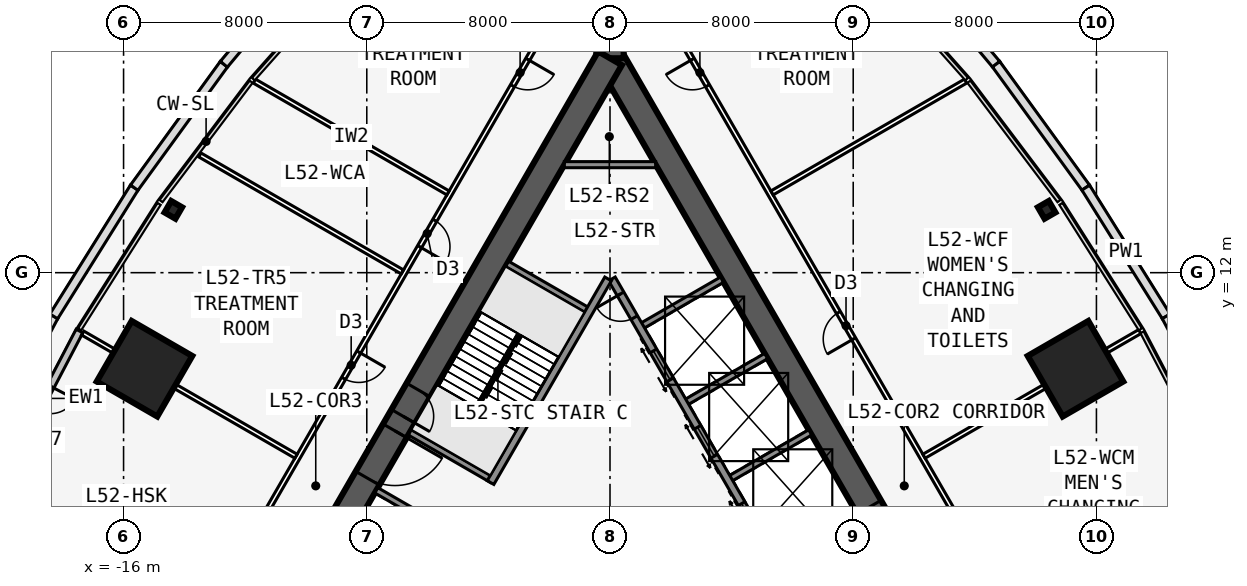
"""IFC4 building model, lengths in metres.
Left out: names, types, materials, properties, quantities, classifications, styles, units other than length and angle.
Written with IfcOpenShell. Run it as: python <this file> out.ifc"""

import sys

from ifc_helpers import new_model, si_unit, direction, frame, frame_2d, origin, origin_2d, place, context, subcontext, project, spatial, rectangle, i_section, extrude, element, fill, save


model = new_model("IFC4")
c1 = context("Model", 3, precision=1e-05, world=origin(), true_north=direction((0.0, 1.0)))
c2 = subcontext(c1, "Body", "Model", "MODEL_VIEW")
j1 = project(units=[si_unit("LENGTHUNIT", "METRE"), si_unit("PLANEANGLEUNIT", "RADIAN")], contexts=[c1])
p1 = place(None, origin())
s1 = spatial("IfcSite", under=j1, at=p1, CompositionType="ELEMENT")
p2 = place(p1, origin())
s2 = spatial("IfcBuilding", under=s1, at=p2, CompositionType="ELEMENT")
p3 = place(p2, frame((0.0, 0.0, 195.9)))
s3 = spatial("IfcBuildingStorey", under=s2, at=p3, CompositionType="ELEMENT", Elevation=195.9)
p4 = place(p3, frame((16.5, -9.526, 0.0), z_axis=(0.0, 0.0, 1.0), x_axis=(-0.499999749417, 0.866025548458, 0.0)))
e1 = element("IfcWall", 1, at=p4, inside=s3, PredefinedType="SHEAR", context=c2, shape_type="SweptSolid", body=[
    extrude(rectangle(XDim=33.0, YDim=0.9, at=frame_2d((16.5, 0.0))), origin(), (0.0, 0.0, 1.0), 5.0),
])
p5 = place(p4, frame((14.15, 0.0, 0.0)))
e2 = element("IfcOpeningElement", 2, at=p5, cuts=e1, PredefinedType="OPENING", context=c2, shape_type="SweptSolid", body=[
    extrude(rectangle(XDim=1.8, YDim=2.13, at=frame_2d((0.9, 1.065))), frame((0.0, 0.46, 0.0), z_axis=(0.0, -1.0, 0.0), x_axis=(1.0, 0.0, 0.0)), (0.0, 0.0, 1.0), 0.92),
])
p6 = place(p4, frame((12.6, 0.0, 0.0)))
e3 = element("IfcOpeningElement", 3, at=p6, cuts=e1, PredefinedType="OPENING", context=c2, shape_type="SweptSolid", body=[
    extrude(rectangle(XDim=1.0, YDim=2.13, at=frame_2d((0.5, 1.065))), frame((0.0, 0.46, 0.0), z_axis=(0.0, -1.0, 0.0), x_axis=(1.0, 0.0, 0.0)), (0.0, 0.0, 1.0), 0.92),
])
p7 = place(p3, frame((5.379, 2.586, 0.0), z_axis=(0.0, 0.0, 1.0), x_axis=(-0.500001375892, 0.866024609411, 0.0)))
e4 = element("IfcWall", 4, at=p7, inside=s3, PredefinedType="SOLIDWALL", context=c2, shape_type="SweptSolid", body=[
    extrude(rectangle(XDim=10.633, YDim=0.25, at=frame_2d((5.316, 0.0))), origin(), (0.0, 0.0, 1.0), 4.835),
])
p8 = place(p7, frame((9.164, 0.0, 0.0)))
e5 = element("IfcOpeningElement", 5, at=p8, cuts=e4, PredefinedType="OPENING", context=c2, shape_type="SweptSolid", body=[
    extrude(rectangle(XDim=0.9, YDim=2.13, at=frame_2d((0.45, 1.065))), frame((0.0, 0.135, 0.0), z_axis=(0.0, -1.0, 0.0), x_axis=(1.0, 0.0, 0.0)), (0.0, 0.0, 1.0), 0.27),
])
p9 = place(p7, frame((1.0, 0.0, 0.0)))
e6 = element("IfcOpeningElement", 6, at=p9, cuts=e4, PredefinedType="OPENING", context=c2, shape_type="SweptSolid", body=[
    extrude(rectangle(XDim=1.1, YDim=2.13, at=frame_2d((0.55, 1.065))), frame((0.0, 0.135, 0.0), z_axis=(0.0, -1.0, 0.0), x_axis=(1.0, 0.0, 0.0)), (0.0, 0.0, 1.0), 0.27),
])
p10 = place(p7, frame((3.9, 0.0, 0.0)))
e7 = element("IfcOpeningElement", 7, at=p10, cuts=e4, PredefinedType="OPENING", context=c2, shape_type="SweptSolid", body=[
    extrude(rectangle(XDim=1.1, YDim=2.13, at=frame_2d((0.55, 1.065))), frame((0.0, 0.135, 0.0), z_axis=(0.0, -1.0, 0.0), x_axis=(1.0, 0.0, 0.0)), (0.0, 0.0, 1.0), 0.27),
])
p11 = place(p7, frame((6.8, 0.0, 0.0)))
e8 = element("IfcOpeningElement", 8, at=p11, cuts=e4, PredefinedType="OPENING", context=c2, shape_type="SweptSolid", body=[
    extrude(rectangle(XDim=1.1, YDim=2.13, at=frame_2d((0.55, 1.065))), frame((0.0, 0.135, 0.0), z_axis=(0.0, -1.0, 0.0), x_axis=(1.0, 0.0, 0.0)), (0.0, 0.0, 1.0), 0.27),
])
for number, where, z_axis, x_axis in (
    (9, (3.879, 5.184, 0.0), (0.0, 0.0, 1.0), (0.866, 0.5, 0.0)),
    (10, (2.429, 7.696, 0.0), (0.0, 0.0, 1.0), (0.866, 0.5, 0.0)),
    (11, (0.979, 10.207, 0.0), (0.0, 0.0, 1.0), (0.866, 0.5, 0.0)),
):
    element("IfcWall", number, at=place(p3, frame(where, z_axis=z_axis, x_axis=x_axis)), inside=s3, PredefinedType="SOLIDWALL", context=c2, shape_type="SweptSolid", body=[
        extrude(rectangle(XDim=3.125, YDim=0.2, at=frame_2d((1.562, 0.0))), origin(), (0.0, 0.0, 1.0), 4.835),
    ])
p12 = place(p3, frame((0.0, 19.052, 0.0), z_axis=(0.0, 0.0, 1.0), x_axis=(-0.499999749417, -0.866025548458, 0.0)))
e12 = element("IfcWall", 12, at=p12, inside=s3, PredefinedType="SHEAR", context=c2, shape_type="SweptSolid", body=[
    extrude(rectangle(XDim=33.0, YDim=0.9, at=frame_2d((16.5, 0.0))), origin(), (0.0, 0.0, 1.0), 5.0),
])
p13 = place(p12, frame((14.15, 0.0, 0.0)))
e13 = element("IfcOpeningElement", 13, at=p13, cuts=e12, PredefinedType="OPENING", context=c2, shape_type="SweptSolid", body=[
    extrude(rectangle(XDim=1.8, YDim=2.13, at=frame_2d((0.9, 1.065))), frame((0.0, 0.46, 0.0), z_axis=(0.0, -1.0, 0.0), x_axis=(1.0, 0.0, 0.0)), (0.0, 0.0, 1.0), 0.92),
])
p14 = place(p12, frame((12.6, 0.0, 0.0)))
e14 = element("IfcOpeningElement", 14, at=p14, cuts=e12, PredefinedType="OPENING", context=c2, shape_type="SweptSolid", body=[
    extrude(rectangle(XDim=1.0, YDim=2.13, at=frame_2d((0.5, 1.065))), frame((0.0, 0.46, 0.0), z_axis=(0.0, -1.0, 0.0), x_axis=(1.0, 0.0, 0.0)), (0.0, 0.0, 1.0), 0.92),
])
p15 = place(p3, frame((-0.062, 11.794, 0.0), z_axis=(0.0, 0.0, 1.0), x_axis=(-0.500006680225, -0.86602154692, 0.0)))
e15 = element("IfcWall", 15, at=p15, inside=s3, PredefinedType="SOLIDWALL", context=c2, shape_type="SweptSolid", body=[
    extrude(rectangle(XDim=7.733, YDim=0.25, at=frame_2d((3.866, 0.0))), origin(), (0.0, 0.0, 1.0), 4.835),
])
for number, where, z_axis, x_axis in (
    (16, (-0.679, 10.727, 0.0), (0.0, 0.0, 1.0), (-0.866, 0.5, 0.0)),
    (17, (-3.879, 5.184, 0.0), (0.0, 0.0, 1.0), (-0.866, 0.5, 0.0)),
    (18, (-4.979, 3.279, 0.0), (0.0, 0.0, 1.0), (-0.866, 0.5, 0.0)),
):
    element("IfcWall", number, at=place(p3, frame(where, z_axis=z_axis, x_axis=x_axis)), inside=s3, PredefinedType="SOLIDWALL", context=c2, shape_type="SweptSolid", body=[
        extrude(rectangle(XDim=3.125, YDim=0.2, at=frame_2d((1.562, 0.0))), origin(), (0.0, 0.0, 1.0), 4.835),
    ])
p16 = place(p3, frame((0.0, 19.052, 0.0), z_axis=(0.0, 0.0, 1.0), x_axis=(0.0, 1.0, 0.0)))
e19 = element("IfcWall", 19, at=p16, inside=s3, PredefinedType="SHEAR", context=c2, shape_type="SweptSolid", body=[
    extrude(rectangle(XDim=4.746, YDim=0.9, at=frame_2d((2.373, 0.0))), origin(), (0.0, 0.0, 1.0), 5.0),
])
p17 = place(p16, frame((1.8, 0.0, 0.0)))
e20 = element("IfcOpeningElement", 20, at=p17, cuts=e19, PredefinedType="OPENING", context=c2, shape_type="SweptSolid", body=[
    extrude(rectangle(XDim=1.8, YDim=2.13, at=frame_2d((0.9, 1.065))), frame((0.0, 0.46, 0.0), z_axis=(0.0, -1.0, 0.0), x_axis=(1.0, 0.0, 0.0)), (0.0, 0.0, 1.0), 0.92),
])
for number, where, z_axis, x_axis in (
    (21, (14.363, 14.066, 0.0), (0.0, 0.0, 1.0), (0.866, 0.5, 0.0)),
    (22, (-14.363, 14.066, 0.0), (0.0, 0.0, 1.0), (-0.866, 0.5, 0.0)),
):
    element("IfcColumn", number, at=place(p3, frame(where, z_axis=z_axis, x_axis=x_axis)), inside=s3, PredefinedType="COLUMN", context=c2, shape_type="SweptSolid", body=[
        extrude(i_section(OverallWidth=0.411, OverallDepth=0.434, WebThickness=0.036, FlangeThickness=0.057, at=origin_2d()), origin(), (0.0, 0.0, 1.0), 5.0),
    ])
for number, where, z_axis, x_axis in (
    (23, (15.312, 8.84, 0.0), (0.0, 0.0, 1.0), (0.866, 0.5, 0.0)),
    (24, (-15.312, 8.84, 0.0), (0.0, 0.0, 1.0), (-0.866, 0.5, 0.0)),
):
    element("IfcColumn", number, at=place(p3, frame(where, z_axis=z_axis, x_axis=x_axis)), inside=s3, PredefinedType="COLUMN", context=c2, shape_type="SweptSolid", body=[
        extrude(rectangle(XDim=2.3, YDim=2.3, at=origin_2d()), origin(), (0.0, 0.0, 1.0), 5.0),
    ])
p18 = place(p3, frame((-17.45, 10.081, 0.0), z_axis=(0.0, 0.0, 1.0), x_axis=(-0.463976002579, -0.885847768542, 0.0)))
e25 = element("IfcWall", 25, at=p18, inside=s3, PredefinedType="STANDARD", context=c2, shape_type="SweptSolid", body=[
    extrude(rectangle(XDim=5.004, YDim=0.25, at=frame_2d((2.502, 0.0))), origin(), (0.0, 0.0, 1.0), 4.835),
])
p19 = place(p18, frame((2.052, 0.0, 0.0)))
e26 = element("IfcOpeningElement", 26, at=p19, cuts=e25, PredefinedType="OPENING", context=c2, shape_type="SweptSolid", body=[
    extrude(rectangle(XDim=0.9, YDim=2.13, at=frame_2d((0.45, 1.065))), frame((0.0, 0.135, 0.0), z_axis=(0.0, -1.0, 0.0), x_axis=(1.0, 0.0, 0.0)), (0.0, 0.0, 1.0), 0.27),
])
p20 = place(p3, frame((-20.638, 6.154, 0.0), z_axis=(0.0, 0.0, 1.0), x_axis=(0.469412641147, 0.882978919528, 0.0)))
e27 = element("IfcWall", 27, at=p20, inside=s3, PredefinedType="PARAPET", context=c2, shape_type="SweptSolid", body=[
    extrude(rectangle(XDim=4.992, YDim=0.3, at=frame_2d((2.496, 0.0))), origin(), (0.0, 0.0, 1.0), 1.1),
])
p21 = place(p3, frame((-18.295, 10.562, 0.0), z_axis=(0.0, 0.0, 1.0), x_axis=(0.529972566993, 0.848014786566, 0.0)))
e28 = element("IfcWall", 28, at=p21, inside=s3, PredefinedType="PARAPET", context=c2, shape_type="SweptSolid", body=[
    extrude(rectangle(XDim=4.993, YDim=0.3, at=frame_2d((2.496, 0.0))), origin(), (0.0, 0.0, 1.0), 1.1),
])
p22 = place(p3, frame((-15.649, 14.796, 0.0), z_axis=(0.0, 0.0, 1.0), x_axis=(0.587682609785, 0.809091558574, 0.0)))
e29 = element("IfcWall", 29, at=p22, inside=s3, PredefinedType="PARAPET", context=c2, shape_type="SweptSolid", body=[
    extrude(rectangle(XDim=5.017, YDim=0.3, at=frame_2d((2.509, 0.0))), origin(), (0.0, 0.0, 1.0), 1.1),
])
for number, where, z_axis, x_axis in (
    (30, (-12.7, 18.856, 0.0), (0.0, 0.0, 1.0), (0.642, 0.767, 0.0)),
    (31, (9.449, 22.74, 0.0), (0.0, 0.0, 1.0), (0.642, -0.767, 0.0)),
):
    element("IfcWall", number, at=place(p3, frame(where, z_axis=z_axis, x_axis=x_axis)), inside=s3, PredefinedType="PARAPET", context=c2, shape_type="SweptSolid", body=[
        extrude(rectangle(XDim=5.066, YDim=0.3, at=frame_2d((2.533, 0.0))), origin(), (0.0, 0.0, 1.0), 1.1),
    ])
p23 = place(p3, frame((12.7, 18.856, 0.0), z_axis=(0.0, 0.0, 1.0), x_axis=(0.587682609785, -0.809091558574, 0.0)))
e32 = element("IfcWall", 32, at=p23, inside=s3, PredefinedType="PARAPET", context=c2, shape_type="SweptSolid", body=[
    extrude(rectangle(XDim=5.017, YDim=0.3, at=frame_2d((2.509, 0.0))), origin(), (0.0, 0.0, 1.0), 1.1),
])
p24 = place(p3, frame((15.649, 14.796, 0.0), z_axis=(0.0, 0.0, 1.0), x_axis=(0.529972566993, -0.848014786566, 0.0)))
e33 = element("IfcWall", 33, at=p24, inside=s3, PredefinedType="PARAPET", context=c2, shape_type="SweptSolid", body=[
    extrude(rectangle(XDim=4.993, YDim=0.3, at=frame_2d((2.496, 0.0))), origin(), (0.0, 0.0, 1.0), 1.1),
])
p25 = place(p3, frame((18.295, 10.562, 0.0), z_axis=(0.0, 0.0, 1.0), x_axis=(0.469412641147, -0.882978919528, 0.0)))
e34 = element("IfcWall", 34, at=p25, inside=s3, PredefinedType="PARAPET", context=c2, shape_type="SweptSolid", body=[
    extrude(rectangle(XDim=4.992, YDim=0.3, at=frame_2d((2.496, 0.0))), origin(), (0.0, 0.0, 1.0), 1.1),
])
p26 = place(p3, frame((20.027, -10.985, 0.0), z_axis=(0.0, 0.0, 1.0), x_axis=(-0.500001677587, 0.866024435227, 0.0)))
e35 = element("IfcWall", 35, at=p26, inside=s3, PredefinedType="PARTITIONING", context=c2, shape_type="SweptSolid", body=[
    extrude(rectangle(XDim=39.054, YDim=0.15, at=frame_2d((19.527, 0.0))), origin(), (0.0, 0.0, 1.0), 4.835),
])
p27 = place(p26, frame((4.414, 0.0, 0.0)))
e36 = element("IfcOpeningElement", 36, at=p27, cuts=e35, PredefinedType="OPENING", context=c2, shape_type="SweptSolid", body=[
    extrude(rectangle(XDim=1.0, YDim=2.13, at=frame_2d((0.5, 1.065))), frame((0.0, 0.085, 0.0), z_axis=(0.0, -1.0, 0.0), x_axis=(1.0, 0.0, 0.0)), (0.0, 0.0, 1.0), 0.17),
])
p28 = place(p26, frame((14.027, 0.0, 0.0)))
e37 = element("IfcOpeningElement", 37, at=p28, cuts=e35, PredefinedType="OPENING", context=c2, shape_type="SweptSolid", body=[
    extrude(rectangle(XDim=1.0, YDim=2.13, at=frame_2d((0.5, 1.065))), frame((0.0, 0.085, 0.0), z_axis=(0.0, -1.0, 0.0), x_axis=(1.0, 0.0, 0.0)), (0.0, 0.0, 1.0), 0.17),
])
p29 = place(p26, frame((24.027, 0.0, 0.0)))
e38 = element("IfcOpeningElement", 38, at=p29, cuts=e35, PredefinedType="OPENING", context=c2, shape_type="SweptSolid", body=[
    extrude(rectangle(XDim=1.0, YDim=2.13, at=frame_2d((0.5, 1.065))), frame((0.0, 0.085, 0.0), z_axis=(0.0, -1.0, 0.0), x_axis=(1.0, 0.0, 0.0)), (0.0, 0.0, 1.0), 0.17),
])
p30 = place(p26, frame((33.64, 0.0, 0.0)))
e39 = element("IfcOpeningElement", 39, at=p30, cuts=e35, PredefinedType="OPENING", context=c2, shape_type="SweptSolid", body=[
    extrude(rectangle(XDim=1.0, YDim=2.13, at=frame_2d((0.5, 1.065))), frame((0.0, 0.085, 0.0), z_axis=(0.0, -1.0, 0.0), x_axis=(1.0, 0.0, 0.0)), (0.0, 0.0, 1.0), 0.17),
])
p31 = place(p3, frame((10.329, 5.963, 0.0), z_axis=(0.0, 0.0, 1.0), x_axis=(0.866026800146, 0.499997581422, 0.0)))
e40 = element("IfcWall", 40, at=p31, inside=s3, PredefinedType="PARTITIONING", context=c2, shape_type="SweptSolid", body=[
    extrude(rectangle(XDim=8.193, YDim=0.15, at=frame_2d((4.097, 0.0))), origin(), (0.0, 0.0, 1.0), 3.989),
])
p32 = place(p3, frame((5.329, 14.623, 0.0), z_axis=(0.0, 0.0, 1.0), x_axis=(0.866018089937, 0.500012667742, 0.0)))
e41 = element("IfcWall", 41, at=p32, inside=s3, PredefinedType="PARTITIONING", context=c2, shape_type="SweptSolid", body=[
    extrude(rectangle(XDim=7.355, YDim=0.15, at=frame_2d((3.677, 0.0))), origin(), (0.0, 0.0, 1.0), 3.989),
])
p33 = place(p3, frame((-0.5, 22.836, 0.0), z_axis=(0.0, 0.0, 1.0), x_axis=(-0.500001677587, -0.866024435227, 0.0)))
e42 = element("IfcWall", 42, at=p33, inside=s3, PredefinedType="PARTITIONING", context=c2, shape_type="SweptSolid", body=[
    extrude(rectangle(XDim=39.054, YDim=0.15, at=frame_2d((19.527, 0.0))), origin(), (0.0, 0.0, 1.0), 4.835),
])
p34 = place(p33, frame((4.414, 0.0, 0.0)))
e43 = element("IfcOpeningElement", 43, at=p34, cuts=e42, PredefinedType="OPENING", context=c2, shape_type="SweptSolid", body=[
    extrude(rectangle(XDim=1.0, YDim=2.13, at=frame_2d((0.5, 1.065))), frame((0.0, 0.085, 0.0), z_axis=(0.0, -1.0, 0.0), x_axis=(1.0, 0.0, 0.0)), (0.0, 0.0, 1.0), 0.17),
])
p35 = place(p33, frame((10.527, 0.0, 0.0)))
e44 = element("IfcOpeningElement", 44, at=p35, cuts=e42, PredefinedType="OPENING", context=c2, shape_type="SweptSolid", body=[
    extrude(rectangle(XDim=1.0, YDim=2.13, at=frame_2d((0.5, 1.065))), frame((0.0, 0.085, 0.0), z_axis=(0.0, -1.0, 0.0), x_axis=(1.0, 0.0, 0.0)), (0.0, 0.0, 1.0), 0.17),
])
p36 = place(p33, frame((15.527, 0.0, 0.0)))
e45 = element("IfcOpeningElement", 45, at=p36, cuts=e42, PredefinedType="OPENING", context=c2, shape_type="SweptSolid", body=[
    extrude(rectangle(XDim=1.0, YDim=2.13, at=frame_2d((0.5, 1.065))), frame((0.0, 0.085, 0.0), z_axis=(0.0, -1.0, 0.0), x_axis=(1.0, 0.0, 0.0)), (0.0, 0.0, 1.0), 0.17),
])
p37 = place(p33, frame((24.027, 0.0, 0.0)))
e46 = element("IfcOpeningElement", 46, at=p37, cuts=e42, PredefinedType="OPENING", context=c2, shape_type="SweptSolid", body=[
    extrude(rectangle(XDim=1.0, YDim=2.13, at=frame_2d((0.5, 1.065))), frame((0.0, 0.085, 0.0), z_axis=(0.0, -1.0, 0.0), x_axis=(1.0, 0.0, 0.0)), (0.0, 0.0, 1.0), 0.17),
])
p38 = place(p33, frame((33.64, 0.0, 0.0)))
e47 = element("IfcOpeningElement", 47, at=p38, cuts=e42, PredefinedType="OPENING", context=c2, shape_type="SweptSolid", body=[
    extrude(rectangle(XDim=1.0, YDim=2.13, at=frame_2d((0.5, 1.065))), frame((0.0, 0.085, 0.0), z_axis=(0.0, -1.0, 0.0), x_axis=(1.0, 0.0, 0.0)), (0.0, 0.0, 1.0), 0.17),
])
p39 = place(p3, frame((-5.329, 14.623, 0.0), z_axis=(0.0, 0.0, 1.0), x_axis=(-0.866018089937, 0.500012667742, 0.0)))
e48 = element("IfcWall", 48, at=p39, inside=s3, PredefinedType="PARTITIONING", context=c2, shape_type="SweptSolid", body=[
    extrude(rectangle(XDim=7.355, YDim=0.15, at=frame_2d((3.677, 0.0))), origin(), (0.0, 0.0, 1.0), 3.989),
])
p40 = place(p3, frame((-6.829, 12.025, 0.0), z_axis=(0.0, 0.0, 1.0), x_axis=(-0.866029684289, 0.499992585876, 0.0)))
e49 = element("IfcWall", 49, at=p40, inside=s3, PredefinedType="PARTITIONING", context=c2, shape_type="SweptSolid", body=[
    extrude(rectangle(XDim=7.693, YDim=0.15, at=frame_2d((3.846, 0.0))), origin(), (0.0, 0.0, 1.0), 4.835),
])
p41 = place(p3, frame((-10.329, 5.963, 0.0), z_axis=(0.0, 0.0, 1.0), x_axis=(-0.866016460812, 0.500015489362, 0.0)))
e50 = element("IfcWall", 50, at=p41, inside=s3, PredefinedType="PARTITIONING", context=c2, shape_type="SweptSolid", body=[
    extrude(rectangle(XDim=8.101, YDim=0.15, at=frame_2d((4.051, 0.0))), origin(), (0.0, 0.0, 1.0), 3.989),
])
p42 = place(p3, frame((-1.501, 15.552, 0.0), z_axis=(0.0, 0.0, 1.0), x_axis=(1.0, 0.0, 0.0)))
e51 = element("IfcWall", 51, at=p42, inside=s3, PredefinedType="SOLIDWALL", context=c2, shape_type="SweptSolid", body=[
    extrude(rectangle(XDim=3.002, YDim=0.2, at=frame_2d((1.501, 0.0))), origin(), (0.0, 0.0, 1.0), 4.835),
])
p43 = place(p3, frame((-2.988, 9.978, 0.0), z_axis=(0.0, 0.0, 1.0), x_axis=(-0.499992232847, -0.866029888106, 0.0)))
e52 = element("IfcWall", 52, at=p43, inside=s3, PredefinedType="SOLIDWALL", context=c2, shape_type="SweptSolid", body=[
    extrude(rectangle(XDim=2.794, YDim=0.1, at=frame_2d((1.397, 0.0))), origin(), (0.0, 0.0, 1.0), 5.0),
])
p44 = place(p29, origin())
e53 = element("IfcDoor", 53, at=p44, inside=s3, OperationType="SINGLE_SWING_LEFT", PredefinedType="DOOR", context=c2, shape_type="SweptSolid", body=[
    extrude(rectangle(XDim=1.0, YDim=2.13, at=frame_2d((0.5, 1.065))), frame((0.0, 0.025, 0.0), z_axis=(0.0, -1.0, 0.0), x_axis=(1.0, 0.0, 0.0)), (0.0, 0.0, 1.0), 0.05),
])
fill(e38, e53)
p45 = place(p30, origin())
e54 = element("IfcDoor", 54, at=p45, inside=s3, OperationType="SINGLE_SWING_RIGHT", PredefinedType="DOOR", context=c2, shape_type="SweptSolid", body=[
    extrude(rectangle(XDim=1.0, YDim=2.13, at=frame_2d((0.5, 1.065))), frame((0.0, 0.025, 0.0), z_axis=(0.0, -1.0, 0.0), x_axis=(1.0, 0.0, 0.0)), (0.0, 0.0, 1.0), 0.05),
])
fill(e39, e54)
p46 = place(p34, origin())
e55 = element("IfcDoor", 55, at=p46, inside=s3, OperationType="SINGLE_SWING_LEFT", PredefinedType="DOOR", context=c2, shape_type="SweptSolid", body=[
    extrude(rectangle(XDim=1.0, YDim=2.13, at=frame_2d((0.5, 1.065))), frame((0.0, 0.025, 0.0), z_axis=(0.0, -1.0, 0.0), x_axis=(1.0, 0.0, 0.0)), (0.0, 0.0, 1.0), 0.05),
])
fill(e43, e55)
p47 = place(p35, origin())
e56 = element("IfcDoor", 56, at=p47, inside=s3, OperationType="SINGLE_SWING_RIGHT", PredefinedType="DOOR", context=c2, shape_type="SweptSolid", body=[
    extrude(rectangle(XDim=1.0, YDim=2.13, at=frame_2d((0.5, 1.065))), frame((0.0, 0.025, 0.0), z_axis=(0.0, -1.0, 0.0), x_axis=(1.0, 0.0, 0.0)), (0.0, 0.0, 1.0), 0.05),
])
fill(e44, e56)
p48 = place(p36, origin())
e57 = element("IfcDoor", 57, at=p48, inside=s3, OperationType="SINGLE_SWING_LEFT", PredefinedType="DOOR", context=c2, shape_type="SweptSolid", body=[
    extrude(rectangle(XDim=1.0, YDim=2.13, at=frame_2d((0.5, 1.065))), frame((0.0, 0.025, 0.0), z_axis=(0.0, -1.0, 0.0), x_axis=(1.0, 0.0, 0.0)), (0.0, 0.0, 1.0), 0.05),
])
fill(e45, e57)
p49 = place(p13, origin())
e58 = element("IfcDoor", 58, at=p49, inside=s3, OperationType="DOUBLE_DOOR_SINGLE_SWING", PredefinedType="DOOR", context=c2, shape_type="SweptSolid", body=[
    extrude(rectangle(XDim=1.8, YDim=2.13, at=frame_2d((0.9, 1.065))), frame((0.0, 0.025, 0.0), z_axis=(0.0, -1.0, 0.0), x_axis=(1.0, 0.0, 0.0)), (0.0, 0.0, 1.0), 0.05),
])
fill(e13, e58)
p50 = place(p14, origin())
e59 = element("IfcDoor", 59, at=p50, inside=s3, OperationType="SINGLE_SWING_RIGHT", PredefinedType="DOOR", context=c2, shape_type="SweptSolid", body=[
    extrude(rectangle(XDim=1.0, YDim=2.13, at=frame_2d((0.5, 1.065))), frame((0.0, 0.025, 0.0), z_axis=(0.0, -1.0, 0.0), x_axis=(1.0, 0.0, 0.0)), (0.0, 0.0, 1.0), 0.05),
])
fill(e14, e59)
p51 = place(p8, origin())
e60 = element("IfcDoor", 60, at=p51, inside=s3, OperationType="SINGLE_SWING_RIGHT", PredefinedType="DOOR", context=c2, shape_type="SweptSolid", body=[
    extrude(rectangle(XDim=0.9, YDim=2.13, at=frame_2d((0.45, 1.065))), frame((0.0, 0.025, 0.0), z_axis=(0.0, -1.0, 0.0), x_axis=(1.0, 0.0, 0.0)), (0.0, 0.0, 1.0), 0.05),
])
fill(e5, e60)
p52 = place(p9, origin())
e61 = element("IfcDoor", 61, at=p52, inside=s3, OperationType="DOUBLE_DOOR_SLIDING", PredefinedType="USERDEFINED", context=c2, shape_type="SweptSolid", body=[
    extrude(rectangle(XDim=1.1, YDim=2.13, at=frame_2d((0.55, 1.065))), frame((0.0, 0.025, 0.0), z_axis=(0.0, -1.0, 0.0), x_axis=(1.0, 0.0, 0.0)), (0.0, 0.0, 1.0), 0.05),
])
fill(e6, e61)
p53 = place(p10, origin())
e62 = element("IfcDoor", 62, at=p53, inside=s3, OperationType="DOUBLE_DOOR_SLIDING", PredefinedType="USERDEFINED", context=c2, shape_type="SweptSolid", body=[
    extrude(rectangle(XDim=1.1, YDim=2.13, at=frame_2d((0.55, 1.065))), frame((0.0, 0.025, 0.0), z_axis=(0.0, -1.0, 0.0), x_axis=(1.0, 0.0, 0.0)), (0.0, 0.0, 1.0), 0.05),
])
fill(e7, e62)
p54 = place(p11, origin())
e63 = element("IfcDoor", 63, at=p54, inside=s3, OperationType="DOUBLE_DOOR_SLIDING", PredefinedType="USERDEFINED", context=c2, shape_type="SweptSolid", body=[
    extrude(rectangle(XDim=1.1, YDim=2.13, at=frame_2d((0.55, 1.065))), frame((0.0, 0.025, 0.0), z_axis=(0.0, -1.0, 0.0), x_axis=(1.0, 0.0, 0.0)), (0.0, 0.0, 1.0), 0.05),
])
fill(e8, e63)
save(model, sys.argv[1])
